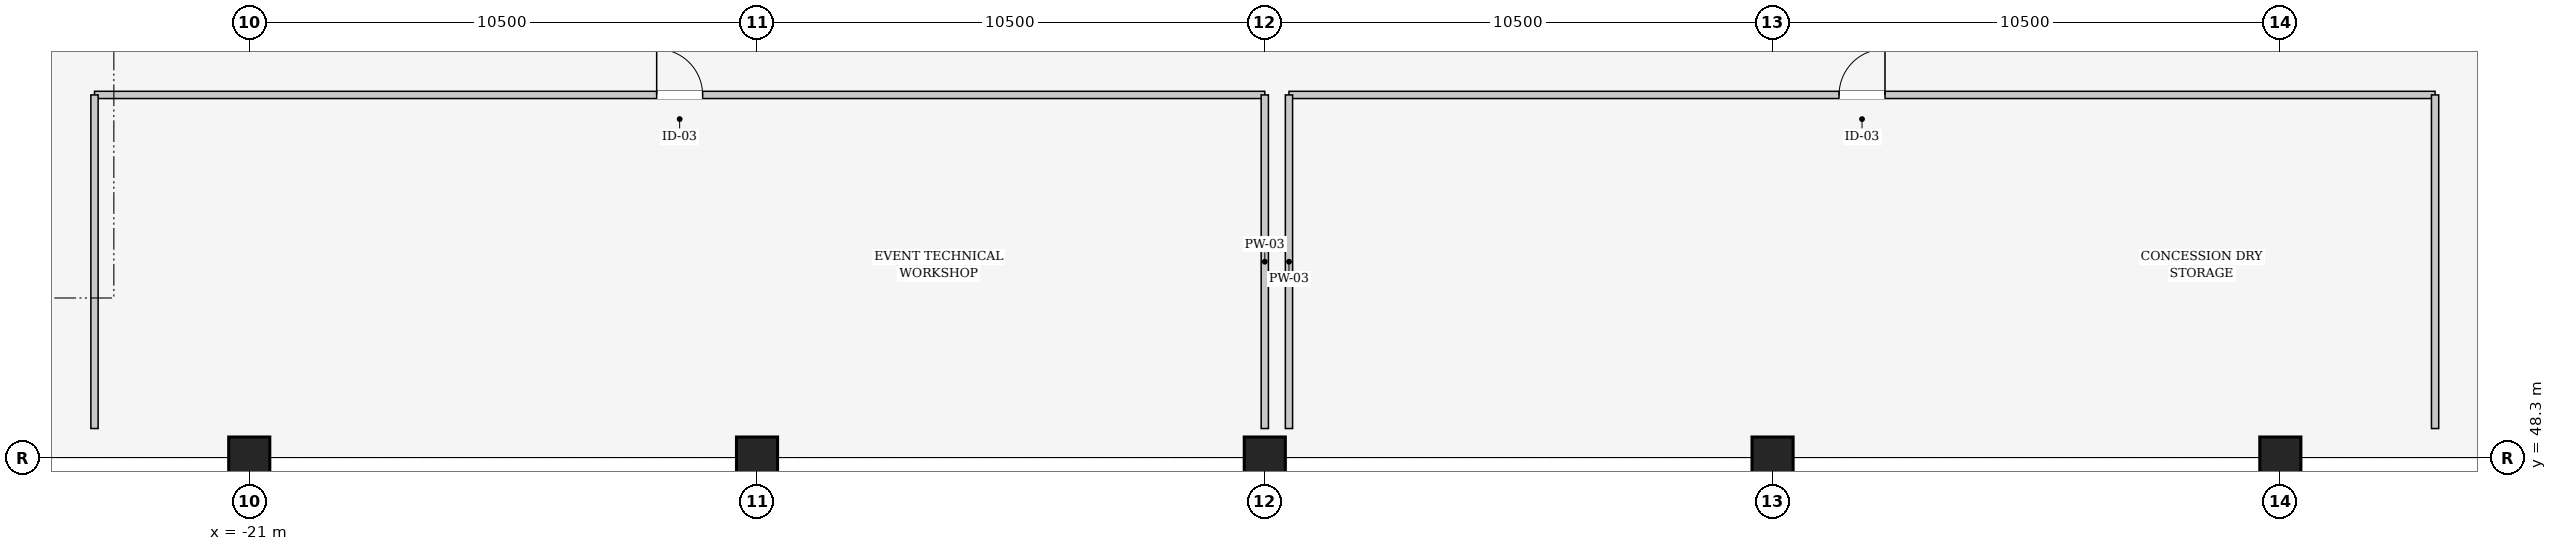
"""IFC4 building model, lengths in metres.
Left out: names, types, materials, properties, quantities, classifications, styles, units other than length and angle.
Written with IfcOpenShell. Run it as: python <this file> out.ifc"""

import sys

from ifc_helpers import new_model, si_unit, direction, frame, frame_2d, origin, origin_2d, place, context, subcontext, project, spatial, rectangle, extrude, element, fill, save


model = new_model("IFC4")
c1 = context("Model", 3, precision=1e-05, world=origin(), true_north=direction((0.0, 1.0)))
c2 = subcontext(c1, "Body", "Model", "MODEL_VIEW")
j1 = project(units=[si_unit("LENGTHUNIT", "METRE"), si_unit("PLANEANGLEUNIT", "RADIAN")], contexts=[c1])
p1 = place(None, origin())
s1 = spatial("IfcSite", under=j1, at=p1, CompositionType="ELEMENT")
p2 = place(p1, origin())
s2 = spatial("IfcBuilding", under=s1, at=p2, CompositionType="ELEMENT")
p3 = place(p2, frame((0.0, 0.0, 6.0)))
s3 = spatial("IfcBuildingStorey", under=s2, at=p3, CompositionType="ELEMENT", Elevation=6.0)
for number, where, z_axis, x_axis in (
    (1, (-21.0, 48.3, 0.0), (0.0, 0.0, 1.0), (1.0, 0.0, 0.0)),
    (2, (-10.5, 48.3, 0.0), (0.0, 0.0, 1.0), (1.0, 0.0, 0.0)),
    (3, (0.0, 48.3, 0.0), (0.0, 0.0, 1.0), (1.0, 0.0, 0.0)),
    (4, (10.5, 48.3, 0.0), (0.0, 0.0, 1.0), (1.0, 0.0, 0.0)),
    (5, (21.0, 48.3, 0.0), (0.0, 0.0, 1.0), (1.0, 0.0, 0.0)),
):
    element("IfcColumn", number, at=place(p3, frame(where, z_axis=z_axis, x_axis=x_axis)), inside=s3, PredefinedType="COLUMN", context=c2, shape_type="SweptSolid", body=[
        extrude(rectangle(XDim=0.85, YDim=0.85, at=origin_2d()), origin(), (0.0, 0.0, 1.0), 5.4),
    ])
p4 = place(p3, frame((-24.2, 55.8, 0.0), z_axis=(0.0, 0.0, 1.0), x_axis=(1.0, 0.0, 0.0)))
e6 = element("IfcWall", 6, at=p4, inside=s3, PredefinedType="PARTITIONING", context=c2, shape_type="SweptSolid", body=[
    extrude(rectangle(XDim=24.2, YDim=0.15, at=frame_2d((12.1, 0.0))), origin(), (0.0, 0.0, 1.0), 4.522),
])
p5 = place(p4, frame((11.625, 0.0, 0.0)))
e7 = element("IfcOpeningElement", 7, at=p5, cuts=e6, PredefinedType="OPENING", context=c2, shape_type="SweptSolid", body=[
    extrude(rectangle(XDim=0.95, YDim=2.15, at=frame_2d((0.475, 1.075))), frame((0.0, 0.085, 0.0), z_axis=(0.0, -1.0, 0.0), x_axis=(1.0, 0.0, 0.0)), (0.0, 0.0, 1.0), 0.17),
])
p6 = place(p3, frame((0.0, 55.8, 0.0), z_axis=(0.0, 0.0, 1.0), x_axis=(0.0, -1.0, 0.0)))
e8 = element("IfcWall", 8, at=p6, inside=s3, PredefinedType="PARTITIONING", context=c2, shape_type="SweptSolid", body=[
    extrude(rectangle(XDim=6.9, YDim=0.15, at=frame_2d((3.45, 0.0))), origin(), (0.0, 0.0, 1.0), 4.522),
])
p7 = place(p3, frame((-24.2, 48.9, 0.0), z_axis=(0.0, 0.0, 1.0), x_axis=(0.0, 1.0, 0.0)))
e9 = element("IfcWall", 9, at=p7, inside=s3, PredefinedType="PARTITIONING", context=c2, shape_type="SweptSolid", body=[
    extrude(rectangle(XDim=6.9, YDim=0.15, at=frame_2d((3.45, 0.0))), origin(), (0.0, 0.0, 1.0), 5.04),
])
p8 = place(p3, frame((0.5, 55.8, 0.0), z_axis=(0.0, 0.0, 1.0), x_axis=(1.0, 0.0, 0.0)))
e10 = element("IfcWall", 10, at=p8, inside=s3, PredefinedType="PARTITIONING", context=c2, shape_type="SweptSolid", body=[
    extrude(rectangle(XDim=23.7, YDim=0.15, at=frame_2d((11.85, 0.0))), origin(), (0.0, 0.0, 1.0), 4.522),
])
p9 = place(p8, frame((11.375, 0.0, 0.0)))
e11 = element("IfcOpeningElement", 11, at=p9, cuts=e10, PredefinedType="OPENING", context=c2, shape_type="SweptSolid", body=[
    extrude(rectangle(XDim=0.95, YDim=2.15, at=frame_2d((0.475, 1.075))), frame((0.0, 0.085, 0.0), z_axis=(0.0, -1.0, 0.0), x_axis=(1.0, 0.0, 0.0)), (0.0, 0.0, 1.0), 0.17),
])
p10 = place(p3, frame((24.2, 55.8, 0.0), z_axis=(0.0, 0.0, 1.0), x_axis=(0.0, -1.0, 0.0)))
e12 = element("IfcWall", 12, at=p10, inside=s3, PredefinedType="PARTITIONING", context=c2, shape_type="SweptSolid", body=[
    extrude(rectangle(XDim=6.9, YDim=0.15, at=frame_2d((3.45, 0.0))), origin(), (0.0, 0.0, 1.0), 5.04),
])
p11 = place(p3, frame((0.5, 48.9, 0.0), z_axis=(0.0, 0.0, 1.0), x_axis=(0.0, 1.0, 0.0)))
e13 = element("IfcWall", 13, at=p11, inside=s3, PredefinedType="PARTITIONING", context=c2, shape_type="SweptSolid", body=[
    extrude(rectangle(XDim=6.9, YDim=0.15, at=frame_2d((3.45, 0.0))), origin(), (0.0, 0.0, 1.0), 4.7),
])
p12 = place(p5, origin())
e14 = element("IfcDoor", 14, at=p12, inside=s3, OperationType="SINGLE_SWING_LEFT", PredefinedType="DOOR", context=c2, shape_type="SweptSolid", body=[
    extrude(rectangle(XDim=0.95, YDim=2.15, at=frame_2d((0.475, 1.075))), frame((0.0, 0.025, 0.0), z_axis=(0.0, -1.0, 0.0), x_axis=(1.0, 0.0, 0.0)), (0.0, 0.0, 1.0), 0.05),
])
fill(e7, e14)
p13 = place(p9, origin())
e15 = element("IfcDoor", 15, at=p13, inside=s3, OperationType="SINGLE_SWING_RIGHT", PredefinedType="DOOR", context=c2, shape_type="SweptSolid", body=[
    extrude(rectangle(XDim=0.95, YDim=2.15, at=frame_2d((0.475, 1.075))), frame((0.0, 0.025, 0.0), z_axis=(0.0, -1.0, 0.0), x_axis=(1.0, 0.0, 0.0)), (0.0, 0.0, 1.0), 0.05),
])
fill(e11, e15)
save(model, sys.argv[1])
